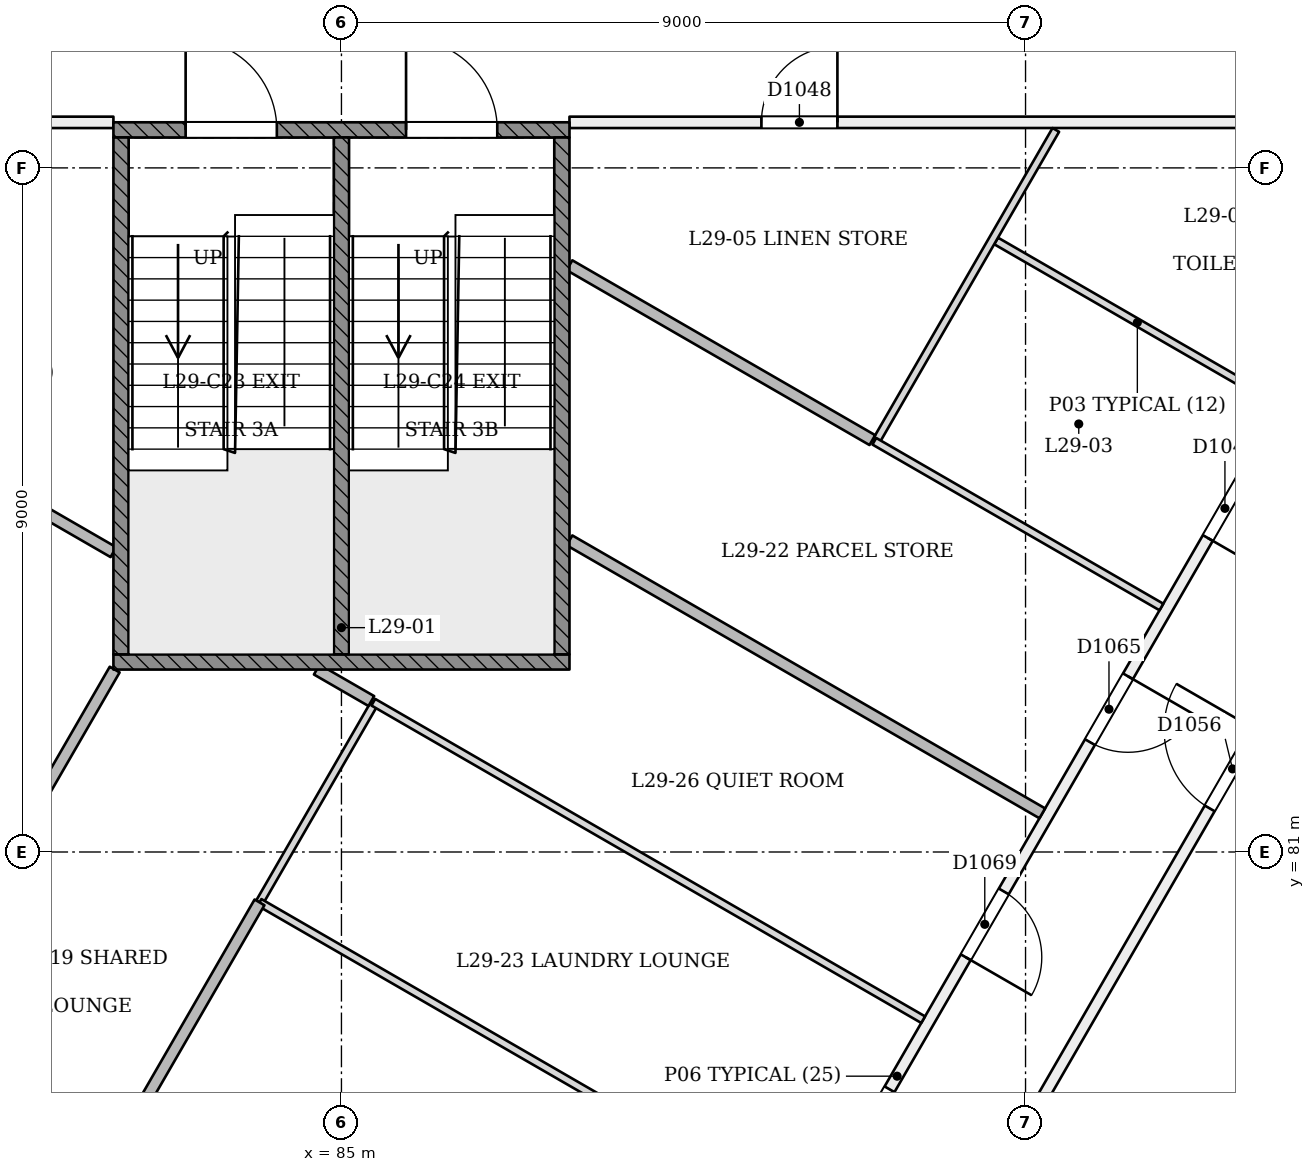
"""IFC4 building model, lengths in metres.
Left out: names, types, materials, properties, quantities, classifications, styles, units other than length and angle.
Written with IfcOpenShell. Run it as: python <this file> out.ifc"""

import sys

from ifc_helpers import new_model, si_unit, direction, frame, frame_2d, origin, place, context, subcontext, project, spatial, rectangle, extrude, element, fill, save


model = new_model("IFC4")
c1 = context("Model", 3, precision=1e-05, world=origin(), true_north=direction((0.0, 1.0)))
c2 = subcontext(c1, "Body", "Model", "MODEL_VIEW")
j1 = project(units=[si_unit("LENGTHUNIT", "METRE"), si_unit("PLANEANGLEUNIT", "RADIAN")], contexts=[c1])
p1 = place(None, origin())
s1 = spatial("IfcSite", under=j1, at=p1, CompositionType="ELEMENT")
p2 = place(p1, origin())
s2 = spatial("IfcBuilding", under=s1, at=p2, CompositionType="ELEMENT")
p3 = place(p2, frame((0.0, 0.0, 115.2)))
s3 = spatial("IfcBuildingStorey", under=s2, at=p3, CompositionType="ELEMENT", Elevation=115.2)
p4 = place(p3, frame((99.556, 90.6, 0.0), z_axis=(0.0, 0.0, 1.0), x_axis=(-0.499996876233, -0.866027207284, 0.0)))
e1 = element("IfcWall", 1, at=p4, inside=s3, PredefinedType="PARTITIONING", context=c2, shape_type="SweptSolid", body=[
    extrude(rectangle(XDim=28.982, YDim=0.15, at=frame_2d((14.491, 0.0))), origin(), (0.0, 0.0, 1.0), 3.15),
])
p5 = place(p4, frame((2.26, 0.0, 0.0)))
e2 = element("IfcOpeningElement", 2, at=p5, cuts=e1, PredefinedType="OPENING", context=c2, shape_type="SweptSolid", body=[
    extrude(rectangle(XDim=0.9, YDim=2.1, at=frame_2d((0.45, 1.05))), frame((0.0, 0.085, 0.0), z_axis=(0.0, -1.0, 0.0), x_axis=(1.0, 0.0, 0.0)), (0.0, 0.0, 1.0), 0.171),
])
p6 = place(p4, frame((5.415, 0.0, 0.0)))
e3 = element("IfcOpeningElement", 3, at=p6, cuts=e1, PredefinedType="OPENING", context=c2, shape_type="SweptSolid", body=[
    extrude(rectangle(XDim=0.9, YDim=2.1, at=frame_2d((0.45, 1.05))), frame((0.0, 0.085, 0.0), z_axis=(0.0, -1.0, 0.0), x_axis=(1.0, 0.0, 0.0)), (0.0, 0.0, 1.0), 0.171),
])
p7 = place(p4, frame((21.124, 0.0, 0.0)))
e4 = element("IfcOpeningElement", 4, at=p7, cuts=e1, PredefinedType="OPENING", context=c2, shape_type="SweptSolid", body=[
    extrude(rectangle(XDim=1.0, YDim=2.1, at=frame_2d((0.5, 1.05))), frame((0.0, 0.085, 0.0), z_axis=(0.0, -1.0, 0.0), x_axis=(1.0, 0.0, 0.0)), (0.0, 0.0, 1.0), 0.171),
])
p8 = place(p4, frame((8.416, 0.0, 0.0)))
e5 = element("IfcOpeningElement", 5, at=p8, cuts=e1, PredefinedType="OPENING", context=c2, shape_type="SweptSolid", body=[
    extrude(rectangle(XDim=1.0, YDim=2.1, at=frame_2d((0.5, 1.05))), frame((0.0, 0.085, 0.0), z_axis=(0.0, -1.0, 0.0), x_axis=(1.0, 0.0, 0.0)), (0.0, 0.0, 1.0), 0.171),
])
p9 = place(p4, frame((14.69, 0.0, 0.0)))
e6 = element("IfcOpeningElement", 6, at=p9, cuts=e1, PredefinedType="OPENING", context=c2, shape_type="SweptSolid", body=[
    extrude(rectangle(XDim=1.0, YDim=2.1, at=frame_2d((0.5, 1.05))), frame((0.0, 0.085, 0.0), z_axis=(0.0, -1.0, 0.0), x_axis=(1.0, 0.0, 0.0)), (0.0, 0.0, 1.0), 0.171),
])
p10 = place(p4, frame((17.719, 0.0, 0.0)))
e7 = element("IfcOpeningElement", 7, at=p10, cuts=e1, PredefinedType="OPENING", context=c2, shape_type="SweptSolid", body=[
    extrude(rectangle(XDim=1.0, YDim=2.1, at=frame_2d((0.5, 1.05))), frame((0.0, 0.085, 0.0), z_axis=(0.0, -1.0, 0.0), x_axis=(1.0, 0.0, 0.0)), (0.0, 0.0, 1.0), 0.171),
])
p11 = place(p4, frame((11.684, 0.0, 0.0)))
e8 = element("IfcOpeningElement", 8, at=p11, cuts=e1, PredefinedType="OPENING", context=c2, shape_type="SweptSolid", body=[
    extrude(rectangle(XDim=1.0, YDim=2.1, at=frame_2d((0.5, 1.05))), frame((0.0, 0.085, 0.0), z_axis=(0.0, -1.0, 0.0), x_axis=(1.0, 0.0, 0.0)), (0.0, 0.0, 1.0), 0.171),
])
p12 = place(p3, frame((88.0, 90.599, 0.0), z_axis=(0.0, 0.0, 1.0), x_axis=(0.999999996347, 8.5470085e-05, 0.0)))
e9 = element("IfcWall", 9, at=p12, inside=s3, PredefinedType="PARTITIONING", context=c2, shape_type="SweptSolid", body=[
    extrude(rectangle(XDim=11.426, YDim=0.15, at=frame_2d((5.713, 0.0))), origin(), (0.0, 0.0, 1.0), 3.15),
])
p13 = place(p12, frame((2.525, 0.0, 0.0)))
e10 = element("IfcOpeningElement", 10, at=p13, cuts=e9, PredefinedType="OPENING", context=c2, shape_type="SweptSolid", body=[
    extrude(rectangle(XDim=1.0, YDim=2.1, at=frame_2d((0.5, 1.05))), frame((0.0, 0.085, 0.0), z_axis=(0.0, -1.0, 0.0), x_axis=(1.0, 0.0, 0.0)), (0.0, 0.0, 1.0), 0.171),
])
p14 = place(p3, frame((64.109, 97.973, 0.0), z_axis=(0.0, 0.0, 1.0), x_axis=(0.499997402089, -0.866026903684, 0.0)))
e11 = element("IfcWall", 11, at=p14, inside=s3, PredefinedType="PARTITIONING", context=c2, shape_type="SweptSolid", body=[
    extrude(rectangle(XDim=41.173, YDim=0.15, at=frame_2d((20.586, 0.0))), origin(), (0.0, 0.0, 1.0), 2.75),
])
p15 = place(p14, frame((0.273, 0.0, 0.0)))
e12 = element("IfcOpeningElement", 12, at=p15, cuts=e11, PredefinedType="OPENING", context=c2, shape_type="SweptSolid", body=[
    extrude(rectangle(XDim=1.2, YDim=2.1, at=frame_2d((0.6, 1.05))), frame((0.0, 0.085, 0.0), z_axis=(0.0, -1.0, 0.0), x_axis=(1.0, 0.0, 0.0)), (0.0, 0.0, 1.0), 0.171),
])
p16 = place(p14, frame((10.987, 0.0, 0.0)))
e13 = element("IfcOpeningElement", 13, at=p16, cuts=e11, PredefinedType="OPENING", context=c2, shape_type="SweptSolid", body=[
    extrude(rectangle(XDim=1.2, YDim=2.1, at=frame_2d((0.6, 1.05))), frame((0.0, 0.085, 0.0), z_axis=(0.0, -1.0, 0.0), x_axis=(1.0, 0.0, 0.0)), (0.0, 0.0, 1.0), 0.171),
])
p17 = place(p14, frame((22.237, 0.0, 0.0)))
e14 = element("IfcOpeningElement", 14, at=p17, cuts=e11, PredefinedType="OPENING", context=c2, shape_type="SweptSolid", body=[
    extrude(rectangle(XDim=1.2, YDim=2.1, at=frame_2d((0.6, 1.05))), frame((0.0, 0.085, 0.0), z_axis=(0.0, -1.0, 0.0), x_axis=(1.0, 0.0, 0.0)), (0.0, 0.0, 1.0), 0.171),
])
p18 = place(p14, frame((32.387, 0.0, 0.0)))
e15 = element("IfcOpeningElement", 15, at=p18, cuts=e11, PredefinedType="OPENING", context=c2, shape_type="SweptSolid", body=[
    extrude(rectangle(XDim=1.2, YDim=2.1, at=frame_2d((0.6, 1.05))), frame((0.0, 0.085, 0.0), z_axis=(0.0, -1.0, 0.0), x_axis=(1.0, 0.0, 0.0)), (0.0, 0.0, 1.0), 0.171),
])
p19 = place(p14, frame((39.95, 0.0, 0.0)))
e16 = element("IfcOpeningElement", 16, at=p19, cuts=e11, PredefinedType="OPENING", context=c2, shape_type="SweptSolid", body=[
    extrude(rectangle(XDim=1.0, YDim=2.1, at=frame_2d((0.5, 1.05))), frame((0.0, 0.085, 0.0), z_axis=(0.0, -1.0, 0.0), x_axis=(1.0, 0.0, 0.0)), (0.0, 0.0, 1.0), 0.171),
])
p20 = place(p3, frame((85.304, 62.316, 0.0), z_axis=(0.0, 0.0, 1.0), x_axis=(0.499997402089, 0.866026903684, 0.0)))
e17 = element("IfcWall", 17, at=p20, inside=s3, PredefinedType="PARTITIONING", context=c2, shape_type="SweptSolid", body=[
    extrude(rectangle(XDim=41.173, YDim=0.15, at=frame_2d((20.586, 0.0))), origin(), (0.0, 0.0, 1.0), 2.75),
])
p21 = place(p20, frame((0.248, 0.0, 0.0)))
e18 = element("IfcOpeningElement", 18, at=p21, cuts=e17, PredefinedType="OPENING", context=c2, shape_type="SweptSolid", body=[
    extrude(rectangle(XDim=1.2, YDim=2.1, at=frame_2d((0.6, 1.05))), frame((0.0, 0.085, 0.0), z_axis=(0.0, -1.0, 0.0), x_axis=(1.0, 0.0, 0.0)), (0.0, 0.0, 1.0), 0.171),
])
p22 = place(p20, frame((8.737, 0.0, 0.0)))
e19 = element("IfcOpeningElement", 19, at=p22, cuts=e17, PredefinedType="OPENING", context=c2, shape_type="SweptSolid", body=[
    extrude(rectangle(XDim=1.2, YDim=2.1, at=frame_2d((0.6, 1.05))), frame((0.0, 0.085, 0.0), z_axis=(0.0, -1.0, 0.0), x_axis=(1.0, 0.0, 0.0)), (0.0, 0.0, 1.0), 0.171),
])
p23 = place(p20, frame((22.237, 0.0, 0.0)))
e20 = element("IfcOpeningElement", 20, at=p23, cuts=e17, PredefinedType="OPENING", context=c2, shape_type="SweptSolid", body=[
    extrude(rectangle(XDim=1.2, YDim=2.1, at=frame_2d((0.6, 1.05))), frame((0.0, 0.085, 0.0), z_axis=(0.0, -1.0, 0.0), x_axis=(1.0, 0.0, 0.0)), (0.0, 0.0, 1.0), 0.171),
])
p24 = place(p20, frame((32.387, 0.0, 0.0)))
e21 = element("IfcOpeningElement", 21, at=p24, cuts=e17, PredefinedType="OPENING", context=c2, shape_type="SweptSolid", body=[
    extrude(rectangle(XDim=1.2, YDim=2.1, at=frame_2d((0.6, 1.05))), frame((0.0, 0.085, 0.0), z_axis=(0.0, -1.0, 0.0), x_axis=(1.0, 0.0, 0.0)), (0.0, 0.0, 1.0), 0.171),
])
p25 = place(p20, frame((39.725, 0.0, 0.0)))
e22 = element("IfcOpeningElement", 22, at=p25, cuts=e17, PredefinedType="OPENING", context=c2, shape_type="SweptSolid", body=[
    extrude(rectangle(XDim=1.2, YDim=2.1, at=frame_2d((0.6, 1.05))), frame((0.0, 0.085, 0.0), z_axis=(0.0, -1.0, 0.0), x_axis=(1.0, 0.0, 0.0)), (0.0, 0.0, 1.0), 0.171),
])
p26 = place(p3, frame((70.574, 90.6, 0.0), z_axis=(0.0, 0.0, 1.0), x_axis=(0.999999996347, -8.5470085e-05, 0.0)))
e23 = element("IfcWall", 23, at=p26, inside=s3, PredefinedType="PARTITIONING", context=c2, shape_type="SweptSolid", body=[
    extrude(rectangle(XDim=11.426, YDim=0.15, at=frame_2d((5.713, 0.0))), origin(), (0.0, 0.0, 1.0), 3.15),
])
p27 = place(p26, frame((7.661, 0.0, 0.0)))
e24 = element("IfcOpeningElement", 24, at=p27, cuts=e23, PredefinedType="OPENING", context=c2, shape_type="SweptSolid", body=[
    extrude(rectangle(XDim=1.0, YDim=2.1, at=frame_2d((0.5, 1.05))), frame((0.0, 0.085, 0.0), z_axis=(0.0, -1.0, 0.0), x_axis=(1.0, 0.0, 0.0)), (0.0, 0.0, 1.0), 0.171),
])
p28 = place(p3, frame((85.0, 65.389, 0.0), z_axis=(0.0, 0.0, 1.0), x_axis=(-0.499995893406, 0.866027774715, 0.0)))
e25 = element("IfcWall", 25, at=p28, inside=s3, PredefinedType="PARTITIONING", context=c2, shape_type="SweptSolid", body=[
    extrude(rectangle(XDim=29.112, YDim=0.15, at=frame_2d((14.556, 0.0))), origin(), (0.0, 0.0, 1.0), 3.15),
])
p29 = place(p28, frame((19.564, 0.0, 0.0)))
e26 = element("IfcOpeningElement", 26, at=p29, cuts=e25, PredefinedType="OPENING", context=c2, shape_type="SweptSolid", body=[
    extrude(rectangle(XDim=1.0, YDim=2.1, at=frame_2d((0.5, 1.05))), frame((0.0, 0.085, 0.0), z_axis=(0.0, -1.0, 0.0), x_axis=(1.0, 0.0, 0.0)), (0.0, 0.0, 1.0), 0.171),
])
p30 = place(p28, frame((12.012, 0.0, 0.0)))
e27 = element("IfcOpeningElement", 27, at=p30, cuts=e25, PredefinedType="OPENING", context=c2, shape_type="SweptSolid", body=[
    extrude(rectangle(XDim=1.2, YDim=2.1, at=frame_2d((0.6, 1.05))), frame((0.0, 0.085, 0.0), z_axis=(0.0, -1.0, 0.0), x_axis=(1.0, 0.0, 0.0)), (0.0, 0.0, 1.0), 0.171),
])
p31 = place(p28, frame((4.164, 0.0, 0.0)))
e28 = element("IfcOpeningElement", 28, at=p31, cuts=e25, PredefinedType="OPENING", context=c2, shape_type="SweptSolid", body=[
    extrude(rectangle(XDim=1.0, YDim=2.1, at=frame_2d((0.5, 1.05))), frame((0.0, 0.085, 0.0), z_axis=(0.0, -1.0, 0.0), x_axis=(1.0, 0.0, 0.0)), (0.0, 0.0, 1.0), 0.171),
])
p32 = place(p28, frame((15.899, 0.0, 0.0)))
e29 = element("IfcOpeningElement", 29, at=p32, cuts=e25, PredefinedType="OPENING", context=c2, shape_type="SweptSolid", body=[
    extrude(rectangle(XDim=1.0, YDim=2.1, at=frame_2d((0.5, 1.05))), frame((0.0, 0.085, 0.0), z_axis=(0.0, -1.0, 0.0), x_axis=(1.0, 0.0, 0.0)), (0.0, 0.0, 1.0), 0.171),
])
p33 = place(p28, frame((23.914, 0.0, 0.0)))
e30 = element("IfcOpeningElement", 30, at=p33, cuts=e25, PredefinedType="OPENING", context=c2, shape_type="SweptSolid", body=[
    extrude(rectangle(XDim=1.2, YDim=2.1, at=frame_2d((0.6, 1.05))), frame((0.0, 0.085, 0.0), z_axis=(0.0, -1.0, 0.0), x_axis=(1.0, 0.0, 0.0)), (0.0, 0.0, 1.0), 0.171),
])
p34 = place(p3, frame((93.613, 89.039, 0.0), z_axis=(0.0, 0.0, 1.0), x_axis=(0.866011257965, -0.500024500477, 0.0)))
e31 = element("IfcWall", 31, at=p34, inside=s3, PredefinedType="PARTITIONING", context=c2, shape_type="SweptSolid", body=[
    extrude(rectangle(XDim=4.291, YDim=0.1, at=frame_2d((2.146, 0.0))), origin(), (0.0, 0.0, 1.0), 3.15),
])
p35 = place(p3, frame((94.398, 90.5, 0.0), z_axis=(0.0, 0.0, 1.0), x_axis=(-0.499988433238, -0.866032081755, 0.0)))
e32 = element("IfcWall", 32, at=p35, inside=s3, PredefinedType="PARTITIONING", context=c2, shape_type="SweptSolid", body=[
    extrude(rectangle(XDim=4.741, YDim=0.1, at=frame_2d((2.37, 0.0))), origin(), (0.0, 0.0, 1.0), 3.15),
])
p36 = place(p3, frame((92.01, 86.404, 0.0), z_axis=(0.0, 0.0, 1.0), x_axis=(0.866029912563, -0.499992190486, 0.0)))
e33 = element("IfcWall", 33, at=p36, inside=s3, PredefinedType="PARTITIONING", context=c2, shape_type="SweptSolid", body=[
    extrude(rectangle(XDim=4.361, YDim=0.1, at=frame_2d((2.181, 0.0))), origin(), (0.0, 0.0, 1.0), 3.15),
])
p37 = place(p3, frame((88.0, 88.719, 0.0), z_axis=(0.0, 0.0, 1.0), x_axis=(0.866046857706, -0.499962838877, 0.0)))
e34 = element("IfcWall", 34, at=p37, inside=s3, PredefinedType="PARTITIONING", context=c2, shape_type="SweptSolid", body=[
    extrude(rectangle(XDim=4.601, YDim=0.15, at=frame_2d((2.3, 0.0))), origin(), (0.0, 0.0, 1.0), 3.15),
])
p38 = place(p3, frame((83.922, 80.337, 0.0), z_axis=(0.0, 0.0, 1.0), x_axis=(0.499996899167, 0.866027194044, 0.0)))
e35 = element("IfcWall", 35, at=p38, inside=s3, PredefinedType="PARTITIONING", context=c2, shape_type="SweptSolid", body=[
    extrude(rectangle(XDim=3.029, YDim=0.1, at=frame_2d((1.514, 0.0))), origin(), (0.0, 0.0, 1.0), 3.15),
])
p39 = place(p3, frame((82.445, 77.779, 0.0), z_axis=(0.0, 0.0, 1.0), x_axis=(0.49999668571, 0.866027317282, 0.0)))
e36 = element("IfcWall", 36, at=p39, inside=s3, PredefinedType="PARTITIONING", context=c2, shape_type="SweptSolid", body=[
    extrude(rectangle(XDim=2.954, YDim=0.15, at=frame_2d((1.477, 0.0))), origin(), (0.0, 0.0, 1.0), 3.15),
])
p40 = place(p3, frame((82.017, 83.4, 0.0), z_axis=(0.0, 0.0, 1.0), x_axis=(-0.499998985737, -0.866025989369, 0.0)))
e37 = element("IfcWall", 37, at=p40, inside=s3, PredefinedType="PARTITIONING", context=c2, shape_type="SweptSolid", body=[
    extrude(rectangle(XDim=7.286, YDim=0.15, at=frame_2d((3.643, 0.0))), origin(), (0.0, 0.0, 1.0), 3.15),
])
p41 = place(p3, frame((85.393, 82.986, 0.0), z_axis=(0.0, 0.0, 1.0), x_axis=(-0.866151262745, 0.499781942495, 0.0)))
e38 = element("IfcWall", 38, at=p41, inside=s3, PredefinedType="PARTITIONING", context=c2, shape_type="SweptSolid", body=[
    extrude(rectangle(XDim=0.829, YDim=0.15, at=frame_2d((0.415, 0.0))), origin(), (0.0, 0.0, 1.0), 3.15),
])
p42 = place(p3, frame((79.991, 86.104, 0.0), z_axis=(0.0, 0.0, 1.0), x_axis=(0.865999790327, -0.500044361186, 0.0)))
e39 = element("IfcWall", 39, at=p42, inside=s3, PredefinedType="PARTITIONING", context=c2, shape_type="SweptSolid", body=[
    extrude(rectangle(XDim=2.32, YDim=0.15, at=frame_2d((1.16, 0.0))), origin(), (0.0, 0.0, 1.0), 3.15),
])
p43 = place(p3, frame((88.0, 85.1, 0.0), z_axis=(0.0, 0.0, 1.0), x_axis=(0.86602143209, -0.500006879113, 0.0)))
e40 = element("IfcWall", 40, at=p43, inside=s3, PredefinedType="PARTITIONING", context=c2, shape_type="SweptSolid", body=[
    extrude(rectangle(XDim=7.183, YDim=0.15, at=frame_2d((3.591, 0.0))), origin(), (0.0, 0.0, 1.0), 3.15),
])
p44 = place(p3, frame((83.922, 80.337, 0.0), z_axis=(0.0, 0.0, 1.0), x_axis=(0.866016767205, -0.500014958696, 0.0)))
e41 = element("IfcWall", 41, at=p44, inside=s3, PredefinedType="PARTITIONING", context=c2, shape_type="SweptSolid", body=[
    extrude(rectangle(XDim=8.333, YDim=0.1, at=frame_2d((4.167, 0.0))), origin(), (0.0, 0.0, 1.0), 3.15),
])
p45 = place(p3, frame((92.653, 78.794, 0.0), z_axis=(0.0, 0.0, 1.0), x_axis=(-0.866036648346, 0.499980523342, 0.0)))
e42 = element("IfcWall", 42, at=p45, inside=s3, PredefinedType="PARTITIONING", context=c2, shape_type="SweptSolid", body=[
    extrude(rectangle(XDim=8.353, YDim=0.1, at=frame_2d((4.176, 0.0))), origin(), (0.0, 0.0, 1.0), 3.15),
])
p46 = place(p3, frame((82.0, 90.5, 0.0), z_axis=(0.0, 0.0, 1.0), x_axis=(1.0, 0.0, 0.0)))
e43 = element("IfcWall", 43, at=p46, inside=s3, PredefinedType="SOLIDWALL", context=c2, shape_type="SweptSolid", body=[
    extrude(rectangle(XDim=6.0, YDim=0.2, at=frame_2d((3.0, 0.0))), origin(), (0.0, 0.0, 1.0), 3.15),
])
p47 = place(p46, frame((0.95, 0.0, 0.0)))
e44 = element("IfcOpeningElement", 44, at=p47, cuts=e43, PredefinedType="OPENING", context=c2, shape_type="SweptSolid", body=[
    extrude(rectangle(XDim=1.2, YDim=2.1, at=frame_2d((0.6, 1.05))), frame((0.0, 0.11, 0.0), z_axis=(0.0, -1.0, 0.0), x_axis=(1.0, 0.0, 0.0)), (0.0, 0.0, 1.0), 0.221),
])
p48 = place(p46, frame((3.85, 0.0, 0.0)))
e45 = element("IfcOpeningElement", 45, at=p48, cuts=e43, PredefinedType="OPENING", context=c2, shape_type="SweptSolid", body=[
    extrude(rectangle(XDim=1.2, YDim=2.1, at=frame_2d((0.6, 1.05))), frame((0.0, 0.11, 0.0), z_axis=(0.0, -1.0, 0.0), x_axis=(1.0, 0.0, 0.0)), (0.0, 0.0, 1.0), 0.221),
])
p49 = place(p3, frame((82.0, 83.5, 0.0), z_axis=(0.0, 0.0, 1.0), x_axis=(1.0, 0.0, 0.0)))
e46 = element("IfcWall", 46, at=p49, inside=s3, PredefinedType="SOLIDWALL", context=c2, shape_type="SweptSolid", body=[
    extrude(rectangle(XDim=6.0, YDim=0.2, at=frame_2d((3.0, 0.0))), origin(), (0.0, 0.0, 1.0), 3.15),
])
for number, where, z_axis, x_axis in (
    (47, (82.1, 83.6, 0.0), (0.0, 0.0, 1.0), (0.0, 1.0, 0.0)),
    (48, (87.9, 83.6, 0.0), (0.0, 0.0, 1.0), (0.0, 1.0, 0.0)),
    (49, (85.0, 83.6, 0.0), (0.0, 0.0, 1.0), (0.0, 1.0, 0.0)),
):
    element("IfcWall", number, at=place(p3, frame(where, z_axis=z_axis, x_axis=x_axis)), inside=s3, PredefinedType="SOLIDWALL", context=c2, shape_type="SweptSolid", body=[
        extrude(rectangle(XDim=6.8, YDim=0.2, at=frame_2d((3.4, 0.0))), origin(), (0.0, 0.0, 1.0), 3.15),
    ])
p50 = place(p6, origin())
e50 = element("IfcDoor", 50, at=p50, inside=s3, OperationType="SINGLE_SWING_RIGHT", PredefinedType="NOTDEFINED", context=c2, shape_type="SweptSolid", body=[
    extrude(rectangle(XDim=0.9, YDim=2.1, at=frame_2d((0.45, 1.05))), frame((0.0, 0.025, 0.0), z_axis=(0.0, -1.0, 0.0), x_axis=(1.0, 0.0, 0.0)), (0.0, 0.0, 1.0), 0.05),
])
fill(e3, e50)
p51 = place(p13, origin())
e51 = element("IfcDoor", 51, at=p51, inside=s3, OperationType="SINGLE_SWING_RIGHT", PredefinedType="NOTDEFINED", context=c2, shape_type="SweptSolid", body=[
    extrude(rectangle(XDim=1.0, YDim=2.1, at=frame_2d((0.5, 1.05))), frame((0.0, 0.025, 0.0), z_axis=(0.0, -1.0, 0.0), x_axis=(1.0, 0.0, 0.0)), (0.0, 0.0, 1.0), 0.05),
])
fill(e10, e51)
p52 = place(p23, origin())
e52 = element("IfcDoor", 52, at=p52, inside=s3, OperationType="SINGLE_SWING_RIGHT", PredefinedType="NOTDEFINED", context=c2, shape_type="SweptSolid", body=[
    extrude(rectangle(XDim=1.2, YDim=2.1, at=frame_2d((0.6, 1.05))), frame((0.0, 0.025, 0.0), z_axis=(0.0, -1.0, 0.0), x_axis=(1.0, 0.0, 0.0)), (0.0, 0.0, 1.0), 0.05),
])
fill(e20, e52)
p53 = place(p8, origin())
e53 = element("IfcDoor", 53, at=p53, inside=s3, OperationType="SINGLE_SWING_LEFT", PredefinedType="NOTDEFINED", context=c2, shape_type="SweptSolid", body=[
    extrude(rectangle(XDim=1.0, YDim=2.1, at=frame_2d((0.5, 1.05))), frame((0.0, 0.025, 0.0), z_axis=(0.0, -1.0, 0.0), x_axis=(1.0, 0.0, 0.0)), (0.0, 0.0, 1.0), 0.05),
])
fill(e5, e53)
p54 = place(p9, origin())
e54 = element("IfcDoor", 54, at=p54, inside=s3, OperationType="SINGLE_SWING_RIGHT", PredefinedType="NOTDEFINED", context=c2, shape_type="SweptSolid", body=[
    extrude(rectangle(XDim=1.0, YDim=2.1, at=frame_2d((0.5, 1.05))), frame((0.0, 0.025, 0.0), z_axis=(0.0, -1.0, 0.0), x_axis=(1.0, 0.0, 0.0)), (0.0, 0.0, 1.0), 0.05),
])
fill(e6, e54)
p55 = place(p11, origin())
e55 = element("IfcDoor", 55, at=p55, inside=s3, OperationType="SINGLE_SWING_RIGHT", PredefinedType="NOTDEFINED", context=c2, shape_type="SweptSolid", body=[
    extrude(rectangle(XDim=1.0, YDim=2.1, at=frame_2d((0.5, 1.05))), frame((0.0, 0.025, 0.0), z_axis=(0.0, -1.0, 0.0), x_axis=(1.0, 0.0, 0.0)), (0.0, 0.0, 1.0), 0.05),
])
fill(e8, e55)
p56 = place(p47, origin())
e56 = element("IfcDoor", 56, at=p56, inside=s3, OperationType="SINGLE_SWING_LEFT", PredefinedType="NOTDEFINED", context=c2, shape_type="SweptSolid", body=[
    extrude(rectangle(XDim=1.2, YDim=2.1, at=frame_2d((0.6, 1.05))), frame((0.0, 0.025, 0.0), z_axis=(0.0, -1.0, 0.0), x_axis=(1.0, 0.0, 0.0)), (0.0, 0.0, 1.0), 0.05),
])
fill(e44, e56)
p57 = place(p48, origin())
e57 = element("IfcDoor", 57, at=p57, inside=s3, OperationType="SINGLE_SWING_LEFT", PredefinedType="NOTDEFINED", context=c2, shape_type="SweptSolid", body=[
    extrude(rectangle(XDim=1.2, YDim=2.1, at=frame_2d((0.6, 1.05))), frame((0.0, 0.025, 0.0), z_axis=(0.0, -1.0, 0.0), x_axis=(1.0, 0.0, 0.0)), (0.0, 0.0, 1.0), 0.05),
])
fill(e45, e57)
save(model, sys.argv[1])
